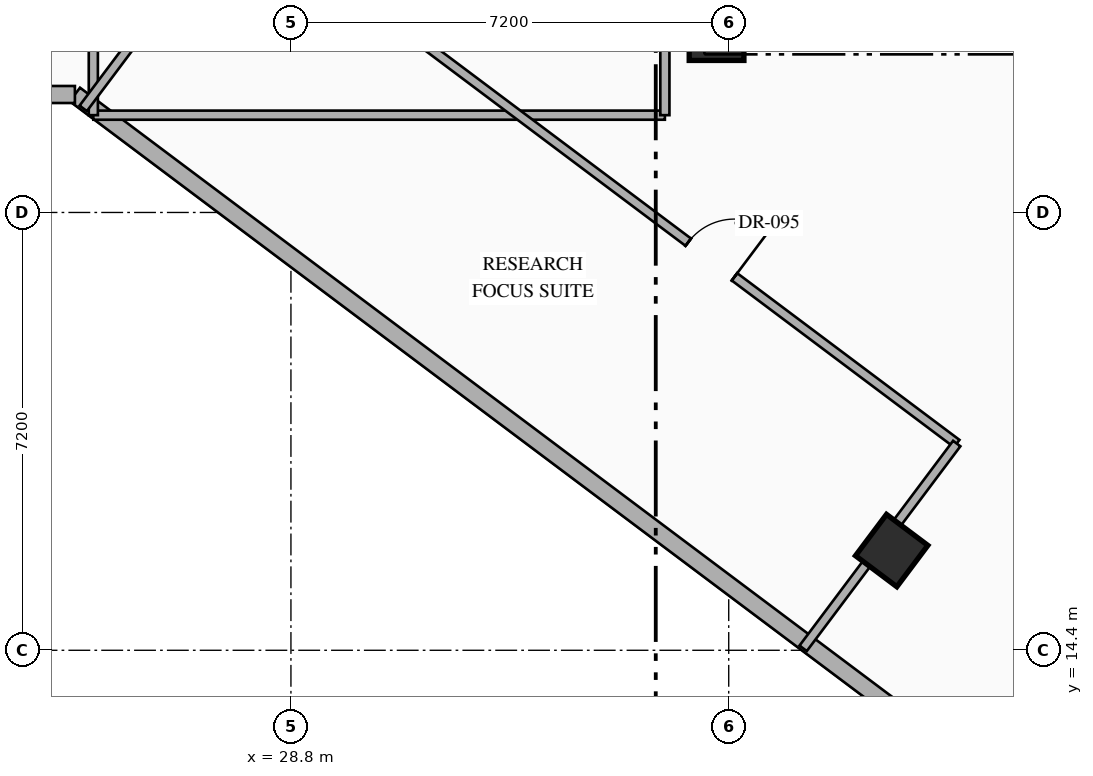
"""IFC4 building model, lengths in metres.
Left out: names, types, materials, properties, quantities, classifications, styles, units other than length and angle.
Written with IfcOpenShell. Run it as: python <this file> out.ifc"""

import sys

from ifc_helpers import new_model, si_unit, direction, frame, frame_2d, origin, origin_2d, place, context, subcontext, project, spatial, rectangle, hollow_rectangle, extrude, element, fill, save


model = new_model("IFC4")
c1 = context("Model", 3, precision=1e-05, world=origin(), true_north=direction((0.0, 1.0)))
c2 = subcontext(c1, "Body", "Model", "MODEL_VIEW")
j1 = project(units=[si_unit("LENGTHUNIT", "METRE"), si_unit("PLANEANGLEUNIT", "RADIAN")], contexts=[c1])
p1 = place(None, origin())
s1 = spatial("IfcSite", under=j1, at=p1, CompositionType="ELEMENT")
p2 = place(p1, origin())
s2 = spatial("IfcBuilding", under=s1, at=p2, CompositionType="ELEMENT")
p3 = place(p2, frame((0.0, 0.0, 134.85)))
s3 = spatial("IfcBuildingStorey", under=s2, at=p3, CompositionType="ELEMENT", Elevation=134.85)
p4 = place(p3, frame((35.8, 24.55, 0.0), z_axis=(0.0, 0.0, 1.0), x_axis=(1.0, 0.0, 0.0)))
e1 = element("IfcColumn", 1, at=p4, inside=s3, PredefinedType="COLUMN", context=c2, shape_type="SweptSolid", body=[
    extrude(rectangle(XDim=0.9, YDim=0.9, at=origin_2d()), origin(), (0.0, 0.0, 1.0), 3.6),
])
p5 = place(p3, frame((38.68, 16.04, 0.0), z_axis=(0.0, 0.0, 1.0), x_axis=(0.799999996291, -0.600000004945, 0.0)))
e2 = element("IfcColumn", 2, at=p5, inside=s3, PredefinedType="COLUMN", context=c2, shape_type="SweptSolid", body=[
    extrude(hollow_rectangle(XDim=0.85, YDim=0.85, WallThickness=0.032, at=origin_2d()), origin(), (0.0, 0.0, 1.0), 3.6),
])
p6 = place(p3, frame((44.918, 8.787, 0.0), z_axis=(0.0, 0.0, 1.0), x_axis=(-0.800004765927, 0.599993645378, 0.0)))
e3 = element("IfcWall", 3, at=p6, inside=s3, PredefinedType="STANDARD", context=c2, shape_type="SweptSolid", body=[
    extrude(rectangle(XDim=24.588, YDim=0.28, at=frame_2d((12.294, 0.0))), origin(), (0.0, 0.0, 1.0), 3.35),
])
p7 = place(p3, frame((25.247, 23.54, 0.0), z_axis=(0.0, 0.0, 1.0), x_axis=(-1.0, 0.0, 0.0)))
e4 = element("IfcWall", 4, at=p7, inside=s3, PredefinedType="STANDARD", context=c2, shape_type="SweptSolid", body=[
    extrude(rectangle(XDim=6.747, YDim=0.28, at=frame_2d((3.374, 0.0))), origin(), (0.0, 0.0, 1.0), 3.35),
])
p8 = place(p3, frame((25.55, 23.2, 0.0), z_axis=(0.0, 0.0, 1.0), x_axis=(1.0, 0.0, 0.0)))
e5 = element("IfcWall", 5, at=p8, inside=s3, PredefinedType="PARTITIONING", context=c2, shape_type="SweptSolid", body=[
    extrude(rectangle(XDim=9.4, YDim=0.15, at=frame_2d((4.7, 0.0))), origin(), (0.0, 0.0, 1.0), 3.35),
])
p9 = place(p3, frame((25.55, 23.2, 0.0), z_axis=(0.0, 0.0, 1.0), x_axis=(0.0, 1.0, 0.0)))
e6 = element("IfcWall", 6, at=p9, inside=s3, PredefinedType="PARTITIONING", context=c2, shape_type="SweptSolid", body=[
    extrude(rectangle(XDim=7.15, YDim=0.15, at=frame_2d((3.575, 0.0))), origin(), (0.0, 0.0, 1.0), 2.695),
])
p10 = place(p3, frame((34.95, 23.2, 0.0), z_axis=(0.0, 0.0, 1.0), x_axis=(0.0, 1.0, 0.0)))
e7 = element("IfcWall", 7, at=p10, inside=s3, PredefinedType="PARTITIONING", context=c2, shape_type="SweptSolid", body=[
    extrude(rectangle(XDim=7.15, YDim=0.15, at=frame_2d((3.575, 0.0))), origin(), (0.0, 0.0, 1.0), 3.35),
])
p11 = place(p3, frame((27.91, 26.68, 0.0), z_axis=(0.0, 0.0, 1.0), x_axis=(0.800005938517, -0.599992081896, 0.0)))
e8 = element("IfcWall", 8, at=p11, inside=s3, PredefinedType="PARTITIONING", context=c2, shape_type="SweptSolid", body=[
    extrude(rectangle(XDim=14.8, YDim=0.15, at=frame_2d((7.4, 0.0))), origin(), (0.0, 0.0, 1.0), 3.35),
])
p12 = place(p11, frame((9.281, 0.0, 0.0)))
e9 = element("IfcOpeningElement", 9, at=p12, cuts=e8, PredefinedType="OPENING", context=c2, shape_type="SweptSolid", body=[
    extrude(rectangle(XDim=0.95, YDim=2.15, at=frame_2d((0.475, 1.075))), frame((0.0, 0.085, 0.0), z_axis=(0.0, -1.0, 0.0), x_axis=(1.0, 0.0, 0.0)), (0.0, 0.0, 1.0), 0.17),
])
p13 = place(p3, frame((25.384, 23.312, 0.0), z_axis=(0.0, 0.0, 1.0), x_axis=(0.599990721155, 0.80000695905, 0.0)))
e10 = element("IfcWall", 10, at=p13, inside=s3, PredefinedType="PARTITIONING", context=c2, shape_type="SweptSolid", body=[
    extrude(rectangle(XDim=4.21, YDim=0.15, at=frame_2d((2.105, 0.0))), origin(), (0.0, 0.0, 1.0), 3.35),
])
p14 = place(p3, frame((37.224, 14.432, 0.0), z_axis=(0.0, 0.0, 1.0), x_axis=(0.599962885857, 0.800027834262, 0.0)))
e11 = element("IfcWall", 11, at=p14, inside=s3, PredefinedType="PARTITIONING", context=c2, shape_type="SweptSolid", body=[
    extrude(rectangle(XDim=4.21, YDim=0.15, at=frame_2d((2.105, 0.0))), origin(), (0.0, 0.0, 1.0), 2.695),
])
p15 = place(p12, origin())
e12 = element("IfcDoor", 12, at=p15, inside=s3, OperationType="SINGLE_SWING_RIGHT", PredefinedType="DOOR", context=c2, shape_type="SweptSolid", body=[
    extrude(rectangle(XDim=0.95, YDim=2.15, at=frame_2d((0.475, 1.075))), frame((0.0, 0.025, 0.0), z_axis=(0.0, -1.0, 0.0), x_axis=(1.0, 0.0, 0.0)), (0.0, 0.0, 1.0), 0.05),
])
fill(e9, e12)
save(model, sys.argv[1])
